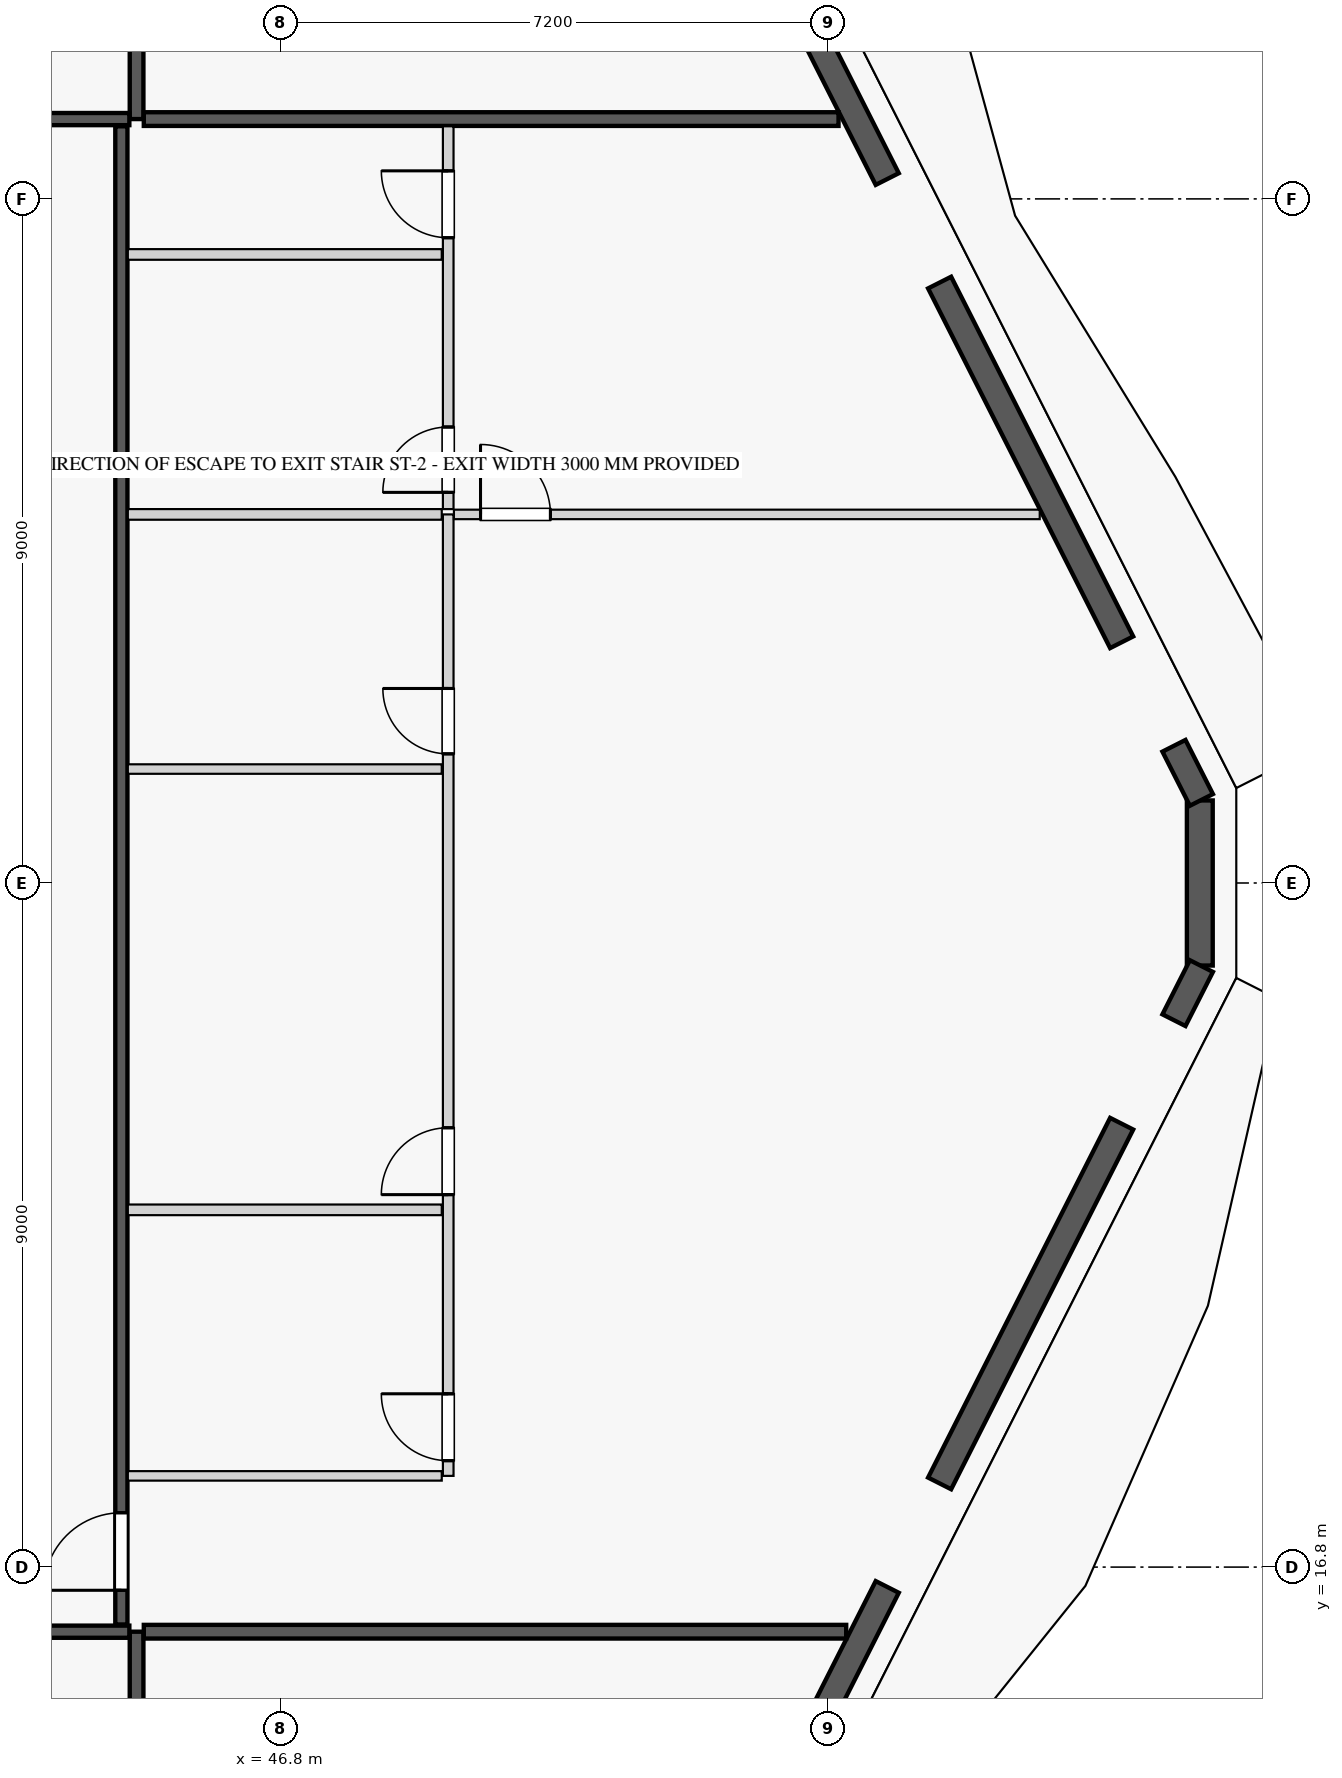
"""IFC4 building model, lengths in metres.
Left out: names, types, materials, properties, quantities, classifications, styles, units other than length and angle.
Written with IfcOpenShell. Run it as: python <this file> out.ifc"""

import sys

from ifc_helpers import new_model, si_unit, direction, frame, frame_2d, origin, origin_2d, place, context, subcontext, project, spatial, rectangle, extrude, element, fill, save


model = new_model("IFC4")
c1 = context("Model", 3, precision=1e-05, world=origin(), true_north=direction((0.0, 1.0)))
c2 = subcontext(c1, "Body", "Model", "MODEL_VIEW")
j1 = project(units=[si_unit("LENGTHUNIT", "METRE"), si_unit("PLANEANGLEUNIT", "RADIAN")], contexts=[c1])
p1 = place(None, origin())
s1 = spatial("IfcSite", under=j1, at=p1, CompositionType="ELEMENT")
p2 = place(p1, origin())
s2 = spatial("IfcBuilding", under=s1, at=p2, CompositionType="ELEMENT")
p3 = place(p2, frame((0.0, 0.0, 35.55)))
s3 = spatial("IfcBuildingStorey", under=s2, at=p3, CompositionType="ELEMENT", Elevation=35.55)
for number, where, z_axis, x_axis in (
    (1, (55.046, 17.22, 0.0), (0.0, 0.0, 1.0), (1.0, 0.0, 0.0)),
    (2, (58.168, 23.314, 0.0), (0.0, 0.0, 1.0), (1.0, 0.0, 0.0)),
    (3, (58.168, 28.286, 0.0), (0.0, 0.0, 1.0), (1.0, 0.0, 0.0)),
    (4, (55.046, 34.38, 0.0), (0.0, 0.0, 1.0), (1.0, 0.0, 0.0)),
):
    element("IfcColumn", number, at=place(p3, frame(where, z_axis=z_axis, x_axis=x_axis)), inside=s3, PredefinedType="COLUMN", context=c2, shape_type="SweptSolid", body=[
        extrude(rectangle(XDim=1.2, YDim=1.2, at=origin_2d()), origin(), (0.0, 0.0, 1.0), 3.55),
    ])
p4 = place(p3, frame((58.168, 25.8, 0.0), z_axis=(0.0, 0.0, 1.0), x_axis=(0.0, 1.0, 0.0)))
e5 = element("IfcColumn", 5, at=p4, inside=s3, PredefinedType="PILASTER", context=c2, shape_type="SweptSolid", body=[
    extrude(rectangle(XDim=0.5, YDim=0.35, at=origin_2d()), origin(), (0.0, 0.0, 1.0), 3.55),
])
p5 = place(p3, frame((58.888, 24.714, 0.0), z_axis=(0.0, 0.0, 1.0), x_axis=(0.0, 1.0, 0.0)))
e6 = element("IfcWall", 6, at=p5, inside=s3, PredefinedType="STANDARD", context=c2, shape_type="SweptSolid", body=[
    extrude(rectangle(XDim=2.172, YDim=0.34, at=frame_2d((1.086, 0.0))), origin(), (0.0, 0.0, 1.0), 3.33),
])
p6 = place(p3, frame((52.271, 11.59, 0.0), z_axis=(0.0, 0.0, 1.0), x_axis=(0.451592100298, 0.892224509273, 0.0)))
e7 = element("IfcWall", 7, at=p6, inside=s3, PredefinedType="STANDARD", context=c2, shape_type="SweptSolid", body=[
    extrude(rectangle(XDim=5.547, YDim=0.34, at=frame_2d((2.773, 0.0))), origin(), (0.0, 0.0, 1.0), 2.787),
])
p7 = place(p6, frame((1.768, 0.0, 0.0)))
e8 = element("IfcOpeningElement", 8, at=p7, cuts=e7, PredefinedType="OPENING", context=c2, shape_type="SweptSolid", body=[
    extrude(rectangle(XDim=1.1, YDim=2.25, at=frame_2d((0.55, 1.125))), frame((0.0, 0.18, 0.0), z_axis=(0.0, -1.0, 0.0), x_axis=(1.0, 0.0, 0.0)), (0.0, 0.0, 1.0), 0.36),
])
p8 = place(p3, frame((55.465, 17.901, 0.0), z_axis=(0.0, 0.0, 1.0), x_axis=(0.451572088722, 0.892234637686, 0.0)))
e9 = element("IfcWall", 9, at=p8, inside=s3, PredefinedType="STANDARD", context=c2, shape_type="SweptSolid", body=[
    extrude(rectangle(XDim=5.304, YDim=0.34, at=frame_2d((2.652, 0.0))), origin(), (0.0, 0.0, 1.0), 2.787),
])
p9 = place(p8, frame((2.102, 0.0, 0.75)))
e10 = element("IfcOpeningElement", 10, at=p9, cuts=e9, PredefinedType="OPENING", context=c2, shape_type="SweptSolid", body=[
    extrude(rectangle(XDim=1.1, YDim=1.887, at=frame_2d((0.55, 0.943))), frame((0.0, 0.18, 0.0), z_axis=(0.0, -1.0, 0.0), x_axis=(1.0, 0.0, 0.0)), (0.0, 0.0, 1.0), 0.36),
])
for number, where, z_axis, x_axis in (
    (11, (58.548, 23.995, 0.0), (0.0, 0.0, 1.0), (0.452, 0.892, 0.0)),
    (12, (58.909, 26.893, 0.0), (0.0, 0.0, 1.0), (-0.452, 0.892, 0.0)),
):
    element("IfcWall", number, at=place(p3, frame(where, z_axis=z_axis, x_axis=x_axis)), inside=s3, PredefinedType="STANDARD", context=c2, shape_type="SweptSolid", body=[
        extrude(rectangle(XDim=0.798, YDim=0.34, at=frame_2d((0.399, 0.0))), origin(), (0.0, 0.0, 1.0), 3.33),
    ])
p10 = place(p3, frame((57.86, 28.967, 0.0), z_axis=(0.0, 0.0, 1.0), x_axis=(-0.451590635984, 0.892225250422, 0.0)))
e13 = element("IfcWall", 13, at=p10, inside=s3, PredefinedType="STANDARD", context=c2, shape_type="SweptSolid", body=[
    extrude(rectangle(XDim=5.303, YDim=0.34, at=frame_2d((2.652, 0.0))), origin(), (0.0, 0.0, 1.0), 2.787),
])
p11 = place(p10, frame((0.384, 0.0, 0.75)))
e14 = element("IfcOpeningElement", 14, at=p11, cuts=e13, PredefinedType="OPENING", context=c2, shape_type="SweptSolid", body=[
    extrude(rectangle(XDim=1.1, YDim=1.887, at=frame_2d((0.55, 0.943))), frame((0.0, 0.18, 0.0), z_axis=(0.0, -1.0, 0.0), x_axis=(1.0, 0.0, 0.0)), (0.0, 0.0, 1.0), 0.36),
])
p12 = place(p10, frame((3.156, 0.0, 0.75)))
e15 = element("IfcOpeningElement", 15, at=p12, cuts=e13, PredefinedType="OPENING", context=c2, shape_type="SweptSolid", body=[
    extrude(rectangle(XDim=1.1, YDim=1.887, at=frame_2d((0.55, 0.943))), frame((0.0, 0.18, 0.0), z_axis=(0.0, -1.0, 0.0), x_axis=(1.0, 0.0, 0.0)), (0.0, 0.0, 1.0), 0.36),
])
p13 = place(p3, frame((54.776, 35.061, 0.0), z_axis=(0.0, 0.0, 1.0), x_axis=(-0.451592100298, 0.892224509273, 0.0)))
e16 = element("IfcWall", 16, at=p13, inside=s3, PredefinedType="STANDARD", context=c2, shape_type="SweptSolid", body=[
    extrude(rectangle(XDim=5.547, YDim=0.34, at=frame_2d((2.773, 0.0))), origin(), (0.0, 0.0, 1.0), 2.787),
])
p14 = place(p13, frame((2.791, 0.0, 0.0)))
e17 = element("IfcOpeningElement", 17, at=p14, cuts=e16, PredefinedType="OPENING", context=c2, shape_type="SweptSolid", body=[
    extrude(rectangle(XDim=1.1, YDim=2.25, at=frame_2d((0.55, 1.125))), frame((0.0, 0.18, 0.0), z_axis=(0.0, -1.0, 0.0), x_axis=(1.0, 0.0, 0.0)), (0.0, 0.0, 1.0), 0.36),
])
p15 = place(p3, frame((44.9, 2.455, 0.0), z_axis=(0.0, 0.0, 1.0), x_axis=(0.0, 1.0, 0.0)))
e18 = element("IfcWall", 18, at=p15, inside=s3, PredefinedType="PARTITIONING", context=c2, shape_type="SweptSolid", body=[
    extrude(rectangle(XDim=13.495, YDim=0.18, at=frame_2d((6.748, 0.0))), origin(), (0.0, 0.0, 1.0), 3.33),
])
p16 = place(p3, frame((28.373, 15.95, 0.0), z_axis=(0.0, 0.0, 1.0), x_axis=(1.0, 0.0, 0.0)))
e19 = element("IfcWall", 19, at=p16, inside=s3, PredefinedType="PARTITIONING", context=c2, shape_type="SweptSolid", body=[
    extrude(rectangle(XDim=16.432, YDim=0.16, at=frame_2d((8.216, 0.0))), origin(), (0.0, 0.0, 1.0), 3.33),
])
p17 = place(p16, frame((0.355, 0.0, 0.0)))
e20 = element("IfcOpeningElement", 20, at=p17, cuts=e19, PredefinedType="OPENING", context=c2, shape_type="SweptSolid", body=[
    extrude(rectangle(XDim=1.35, YDim=2.35, at=frame_2d((0.675, 1.175))), frame((0.0, 0.09, 0.0), z_axis=(0.0, -1.0, 0.0), x_axis=(1.0, 0.0, 0.0)), (0.0, 0.0, 1.0), 0.18),
])
p18 = place(p3, frame((44.9, 35.85, 0.0), z_axis=(0.0, 0.0, 1.0), x_axis=(0.0, 1.0, 0.0)))
e21 = element("IfcWall", 21, at=p18, inside=s3, PredefinedType="PARTITIONING", context=c2, shape_type="SweptSolid", body=[
    extrude(rectangle(XDim=13.295, YDim=0.18, at=frame_2d((6.647, 0.0))), origin(), (0.0, 0.0, 1.0), 3.33),
])
p19 = place(p3, frame((36.617, 35.85, 0.0), z_axis=(0.0, 0.0, 1.0), x_axis=(1.0, 0.0, 0.0)))
e22 = element("IfcWall", 22, at=p19, inside=s3, PredefinedType="PARTITIONING", context=c2, shape_type="SweptSolid", body=[
    extrude(rectangle(XDim=8.188, YDim=0.16, at=frame_2d((4.094, 0.0))), origin(), (0.0, 0.0, 1.0), 3.33),
])
p20 = place(p19, frame((0.355, 0.0, 0.0)))
e23 = element("IfcOpeningElement", 23, at=p20, cuts=e22, PredefinedType="OPENING", context=c2, shape_type="SweptSolid", body=[
    extrude(rectangle(XDim=1.02, YDim=2.25, at=frame_2d((0.51, 1.125))), frame((0.0, 0.09, 0.0), z_axis=(0.0, -1.0, 0.0), x_axis=(1.0, 0.0, 0.0)), (0.0, 0.0, 1.0), 0.18),
])
p21 = place(p3, frame((44.995, 15.95, 0.0), z_axis=(0.0, 0.0, 1.0), x_axis=(1.0, 0.0, 0.0)))
e24 = element("IfcWall", 24, at=p21, inside=s3, PredefinedType="PARTITIONING", context=c2, shape_type="SweptSolid", body=[
    extrude(rectangle(XDim=9.241, YDim=0.18, at=frame_2d((4.621, 0.0))), origin(), (0.0, 0.0, 1.0), 3.33),
])
p22 = place(p3, frame((44.995, 35.85, 0.0), z_axis=(0.0, 0.0, 1.0), x_axis=(1.0, 0.0, 0.0)))
e25 = element("IfcWall", 25, at=p22, inside=s3, PredefinedType="PARTITIONING", context=c2, shape_type="SweptSolid", body=[
    extrude(rectangle(XDim=9.14, YDim=0.18, at=frame_2d((4.57, 0.0))), origin(), (0.0, 0.0, 1.0), 3.33),
])
p23 = place(p3, frame((44.7, 16.045, 0.0), z_axis=(0.0, 0.0, 1.0), x_axis=(0.0, 1.0, 0.0)))
e26 = element("IfcWall", 26, at=p23, inside=s3, PredefinedType="PARTITIONING", context=c2, shape_type="SweptSolid", body=[
    extrude(rectangle(XDim=19.71, YDim=0.16, at=frame_2d((9.855, 0.0))), origin(), (0.0, 0.0, 1.0), 2.7),
])
p24 = place(p23, frame((0.45, 0.0, 0.0)))
e27 = element("IfcOpeningElement", 27, at=p24, cuts=e26, PredefinedType="OPENING", context=c2, shape_type="SweptSolid", body=[
    extrude(rectangle(XDim=1.02, YDim=2.25, at=frame_2d((0.51, 1.125))), frame((0.0, 0.09, 0.0), z_axis=(0.0, -1.0, 0.0), x_axis=(1.0, 0.0, 0.0)), (0.0, 0.0, 1.0), 0.18),
])
p25 = place(p3, frame((44.785, 18.0, 0.0), z_axis=(0.0, 0.0, 1.0), x_axis=(1.0, 0.0, 0.0)))
e28 = element("IfcWall", 28, at=p25, inside=s3, PredefinedType="PARTITIONING", context=c2, shape_type="SweptSolid", body=[
    extrude(rectangle(XDim=4.13, YDim=0.125, at=frame_2d((2.065, 0.0))), origin(), (0.0, 0.0, 1.0), 2.7),
])
p26 = place(p3, frame((49.0, 18.0, 0.0), z_axis=(0.0, 0.0, 1.0), x_axis=(0.0, 1.0, 0.0)))
e29 = element("IfcWall", 29, at=p26, inside=s3, PredefinedType="PLUMBINGWALL", context=c2, shape_type="SweptSolid", body=[
    extrude(rectangle(XDim=12.649, YDim=0.14, at=frame_2d((6.324, 0.0))), origin(), (0.0, 0.0, 1.0), 3.33),
])
p27 = place(p26, frame((0.2, 0.0, 0.0)))
e30 = element("IfcOpeningElement", 30, at=p27, cuts=e29, PredefinedType="OPENING", context=c2, shape_type="SweptSolid", body=[
    extrude(rectangle(XDim=0.88, YDim=2.15, at=frame_2d((0.44, 1.075))), frame((0.0, 0.08, 0.0), z_axis=(0.0, -1.0, 0.0), x_axis=(1.0, 0.0, 0.0)), (0.0, 0.0, 1.0), 0.16),
])
p28 = place(p26, frame((3.7, 0.0, 0.0)))
e31 = element("IfcOpeningElement", 31, at=p28, cuts=e29, PredefinedType="OPENING", context=c2, shape_type="SweptSolid", body=[
    extrude(rectangle(XDim=0.88, YDim=2.15, at=frame_2d((0.44, 1.075))), frame((0.0, 0.08, 0.0), z_axis=(0.0, -1.0, 0.0), x_axis=(1.0, 0.0, 0.0)), (0.0, 0.0, 1.0), 0.16),
])
p29 = place(p26, frame((9.499, 0.0, 0.0)))
e32 = element("IfcOpeningElement", 32, at=p29, cuts=e29, PredefinedType="OPENING", context=c2, shape_type="SweptSolid", body=[
    extrude(rectangle(XDim=0.86, YDim=2.1, at=frame_2d((0.43, 1.05))), frame((0.0, 0.08, 0.0), z_axis=(0.0, -1.0, 0.0), x_axis=(1.0, 0.0, 0.0)), (0.0, 0.0, 1.0), 0.16),
])
p30 = place(p3, frame((49.0, 30.719, 0.0), z_axis=(0.0, 0.0, 1.0), x_axis=(0.0, 1.0, 0.0)))
e33 = element("IfcWall", 33, at=p30, inside=s3, PredefinedType="PLUMBINGWALL", context=c2, shape_type="SweptSolid", body=[
    extrude(rectangle(XDim=5.036, YDim=0.14, at=frame_2d((2.518, 0.0))), origin(), (0.0, 0.0, 1.0), 3.33),
])
p31 = place(p30, frame((0.22, 0.0, 0.0)))
e34 = element("IfcOpeningElement", 34, at=p31, cuts=e33, PredefinedType="OPENING", context=c2, shape_type="SweptSolid", body=[
    extrude(rectangle(XDim=0.86, YDim=2.1, at=frame_2d((0.43, 1.05))), frame((0.0, 0.08, 0.0), z_axis=(0.0, -1.0, 0.0), x_axis=(1.0, 0.0, 0.0)), (0.0, 0.0, 1.0), 0.16),
])
p32 = place(p30, frame((3.57, 0.0, 0.0)))
e35 = element("IfcOpeningElement", 35, at=p32, cuts=e33, PredefinedType="OPENING", context=c2, shape_type="SweptSolid", body=[
    extrude(rectangle(XDim=0.88, YDim=2.15, at=frame_2d((0.44, 1.075))), frame((0.0, 0.08, 0.0), z_axis=(0.0, -1.0, 0.0), x_axis=(1.0, 0.0, 0.0)), (0.0, 0.0, 1.0), 0.16),
])
p33 = place(p3, frame((44.785, 30.649, 0.0), z_axis=(0.0, 0.0, 1.0), x_axis=(1.0, 0.0, 0.0)))
e36 = element("IfcWall", 36, at=p33, inside=s3, PredefinedType="PLUMBINGWALL", context=c2, shape_type="SweptSolid", body=[
    extrude(rectangle(XDim=4.13, YDim=0.14, at=frame_2d((2.065, 0.0))), origin(), (0.0, 0.0, 1.0), 3.33),
])
p34 = place(p3, frame((49.075, 30.649, 0.0), z_axis=(0.0, 0.0, 1.0), x_axis=(1.0, 0.0, 0.0)))
e37 = element("IfcWall", 37, at=p34, inside=s3, PredefinedType="PARTITIONING", context=c2, shape_type="SweptSolid", body=[
    extrude(rectangle(XDim=7.707, YDim=0.125, at=frame_2d((3.854, 0.0))), origin(), (0.0, 0.0, 1.0), 3.33),
])
p35 = place(p34, frame((0.35, 0.0, 0.0)))
e38 = element("IfcOpeningElement", 38, at=p35, cuts=e37, PredefinedType="OPENING", context=c2, shape_type="SweptSolid", body=[
    extrude(rectangle(XDim=0.92, YDim=2.15, at=frame_2d((0.46, 1.075))), frame((0.0, 0.073, 0.0), z_axis=(0.0, -1.0, 0.0), x_axis=(1.0, 0.0, 0.0)), (0.0, 0.0, 1.0), 0.145),
])
p36 = place(p3, frame((44.785, 21.5, 0.0), z_axis=(0.0, 0.0, 1.0), x_axis=(1.0, 0.0, 0.0)))
e39 = element("IfcWall", 39, at=p36, inside=s3, PredefinedType="PLUMBINGWALL", context=c2, shape_type="SweptSolid", body=[
    extrude(rectangle(XDim=4.13, YDim=0.14, at=frame_2d((2.065, 0.0))), origin(), (0.0, 0.0, 1.0), 3.33),
])
p37 = place(p3, frame((44.785, 27.299, 0.0), z_axis=(0.0, 0.0, 1.0), x_axis=(1.0, 0.0, 0.0)))
e40 = element("IfcWall", 40, at=p37, inside=s3, PredefinedType="PARTITIONING", context=c2, shape_type="SweptSolid", body=[
    extrude(rectangle(XDim=4.13, YDim=0.125, at=frame_2d((2.065, 0.0))), origin(), (0.0, 0.0, 1.0), 3.33),
])
p38 = place(p3, frame((44.785, 34.069, 0.0), z_axis=(0.0, 0.0, 1.0), x_axis=(1.0, 0.0, 0.0)))
e41 = element("IfcWall", 41, at=p38, inside=s3, PredefinedType="PLUMBINGWALL", context=c2, shape_type="SweptSolid", body=[
    extrude(rectangle(XDim=4.13, YDim=0.14, at=frame_2d((2.065, 0.0))), origin(), (0.0, 0.0, 1.0), 2.7),
])
p39 = place(p9, origin())
e42 = element("IfcWindow", 42, at=p39, inside=s3, PartitioningType="SINGLE_PANEL", PredefinedType="WINDOW", context=c2, shape_type="SweptSolid", body=[
    extrude(rectangle(XDim=1.1, YDim=1.887, at=frame_2d((0.55, 0.943))), frame((0.0, 0.03, 0.0), z_axis=(0.0, -1.0, 0.0), x_axis=(1.0, 0.0, 0.0)), (0.0, 0.0, 1.0), 0.06),
])
fill(e10, e42)
p40 = place(p11, origin())
e43 = element("IfcWindow", 43, at=p40, inside=s3, PartitioningType="SINGLE_PANEL", PredefinedType="WINDOW", context=c2, shape_type="SweptSolid", body=[
    extrude(rectangle(XDim=1.1, YDim=1.887, at=frame_2d((0.55, 0.943))), frame((0.0, 0.03, 0.0), z_axis=(0.0, -1.0, 0.0), x_axis=(1.0, 0.0, 0.0)), (0.0, 0.0, 1.0), 0.06),
])
fill(e14, e43)
p41 = place(p27, origin())
e44 = element("IfcDoor", 44, at=p41, inside=s3, OperationType="SINGLE_SWING_RIGHT", PredefinedType="DOOR", context=c2, shape_type="SweptSolid", body=[
    extrude(rectangle(XDim=0.88, YDim=2.15, at=frame_2d((0.44, 1.075))), frame((0.0, 0.025, 0.0), z_axis=(0.0, -1.0, 0.0), x_axis=(1.0, 0.0, 0.0)), (0.0, 0.0, 1.0), 0.05),
])
fill(e30, e44)
p42 = place(p28, origin())
e45 = element("IfcDoor", 45, at=p42, inside=s3, OperationType="SINGLE_SWING_LEFT", PredefinedType="DOOR", context=c2, shape_type="SweptSolid", body=[
    extrude(rectangle(XDim=0.88, YDim=2.15, at=frame_2d((0.44, 1.075))), frame((0.0, 0.025, 0.0), z_axis=(0.0, -1.0, 0.0), x_axis=(1.0, 0.0, 0.0)), (0.0, 0.0, 1.0), 0.05),
])
fill(e31, e45)
p43 = place(p29, origin())
e46 = element("IfcDoor", 46, at=p43, inside=s3, OperationType="SINGLE_SWING_RIGHT", PredefinedType="DOOR", context=c2, shape_type="SweptSolid", body=[
    extrude(rectangle(XDim=0.86, YDim=2.1, at=frame_2d((0.43, 1.05))), frame((0.0, 0.025, 0.0), z_axis=(0.0, -1.0, 0.0), x_axis=(1.0, 0.0, 0.0)), (0.0, 0.0, 1.0), 0.05),
])
fill(e32, e46)
p44 = place(p31, origin())
e47 = element("IfcDoor", 47, at=p44, inside=s3, OperationType="SINGLE_SWING_LEFT", PredefinedType="DOOR", context=c2, shape_type="SweptSolid", body=[
    extrude(rectangle(XDim=0.86, YDim=2.1, at=frame_2d((0.43, 1.05))), frame((0.0, 0.025, 0.0), z_axis=(0.0, -1.0, 0.0), x_axis=(1.0, 0.0, 0.0)), (0.0, 0.0, 1.0), 0.05),
])
fill(e34, e47)
p45 = place(p32, origin())
e48 = element("IfcDoor", 48, at=p45, inside=s3, OperationType="SINGLE_SWING_RIGHT", PredefinedType="DOOR", context=c2, shape_type="SweptSolid", body=[
    extrude(rectangle(XDim=0.88, YDim=2.15, at=frame_2d((0.44, 1.075))), frame((0.0, 0.025, 0.0), z_axis=(0.0, -1.0, 0.0), x_axis=(1.0, 0.0, 0.0)), (0.0, 0.0, 1.0), 0.05),
])
fill(e35, e48)
p46 = place(p24, origin())
e49 = element("IfcDoor", 49, at=p46, inside=s3, OperationType="SINGLE_SWING_LEFT", PredefinedType="DOOR", context=c2, shape_type="SweptSolid", body=[
    extrude(rectangle(XDim=1.02, YDim=2.25, at=frame_2d((0.51, 1.125))), frame((0.0, 0.025, 0.0), z_axis=(0.0, -1.0, 0.0), x_axis=(1.0, 0.0, 0.0)), (0.0, 0.0, 1.0), 0.05),
])
fill(e27, e49)
p47 = place(p35, origin())
e50 = element("IfcDoor", 50, at=p47, inside=s3, OperationType="SINGLE_SWING_LEFT", PredefinedType="DOOR", context=c2, shape_type="SweptSolid", body=[
    extrude(rectangle(XDim=0.92, YDim=2.15, at=frame_2d((0.46, 1.075))), frame((0.0, 0.025, 0.0), z_axis=(0.0, -1.0, 0.0), x_axis=(1.0, 0.0, 0.0)), (0.0, 0.0, 1.0), 0.05),
])
fill(e38, e50)
p48 = place(p12, origin())
e51 = element("IfcWindow", 51, at=p48, inside=s3, PartitioningType="SINGLE_PANEL", PredefinedType="WINDOW", context=c2, shape_type="SweptSolid", body=[
    extrude(rectangle(XDim=1.1, YDim=1.887, at=frame_2d((0.55, 0.943))), frame((0.0, 0.03, 0.0), z_axis=(0.0, -1.0, 0.0), x_axis=(1.0, 0.0, 0.0)), (0.0, 0.0, 1.0), 0.06),
])
fill(e15, e51)
save(model, sys.argv[1])
